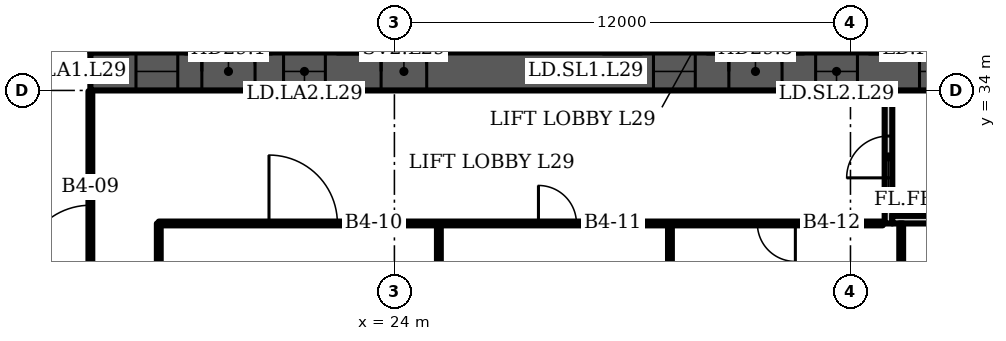
"""IFC4 building model, lengths in metres.
Left out: names, types, materials, properties, quantities, classifications, styles, units other than length and angle.
Written with IfcOpenShell. Run it as: python <this file> out.ifc"""

import sys

from ifc_helpers import new_model, si_unit, direction, frame, frame_2d, origin, place, context, subcontext, project, spatial, rectangle, extrude, element, fill, save


model = new_model("IFC4")
c1 = context("Model", 3, precision=1e-05, world=origin(), true_north=direction((0.0, 1.0)))
c2 = subcontext(c1, "Body", "Model", "MODEL_VIEW")
j1 = project(units=[si_unit("LENGTHUNIT", "METRE"), si_unit("PLANEANGLEUNIT", "RADIAN")], contexts=[c1])
p1 = place(None, origin())
s1 = spatial("IfcSite", under=j1, at=p1, CompositionType="ELEMENT")
p2 = place(p1, origin())
s2 = spatial("IfcBuilding", under=s1, at=p2, CompositionType="ELEMENT")
p3 = place(p2, frame((0.0, 0.0, 125.5)))
s3 = spatial("IfcBuildingStorey", under=s2, at=p3, CompositionType="ELEMENT", Elevation=125.5)
p4 = place(p3, frame((16.0, 34.5, 0.0), z_axis=(0.0, 0.0, 1.0), x_axis=(1.0, 0.0, 0.0)))
e1 = element("IfcWall", 1, at=p4, inside=s3, PredefinedType="SHEAR", context=c2, shape_type="SweptSolid", body=[
    extrude(rectangle(XDim=49.0, YDim=1.0, at=frame_2d((24.5, 0.0))), origin(), (0.0, 0.0, 1.0), 3.6),
])
p5 = place(p4, frame((1.2, 0.0, 0.0)))
e2 = element("IfcOpeningElement", 2, at=p5, cuts=e1, PredefinedType="OPENING", context=c2, shape_type="SweptSolid", body=[
    extrude(rectangle(XDim=1.1, YDim=2.1, at=frame_2d((0.55, 1.05))), frame((0.0, 0.51, 0.0), z_axis=(0.0, -1.0, 0.0), x_axis=(1.0, 0.0, 0.0)), (0.0, 0.0, 1.0), 1.02),
])
p6 = place(p4, frame((5.083, 0.0, 0.0)))
e3 = element("IfcOpeningElement", 3, at=p6, cuts=e1, PredefinedType="OPENING", context=c2, shape_type="SweptSolid", body=[
    extrude(rectangle(XDim=1.1, YDim=2.1, at=frame_2d((0.55, 1.05))), frame((0.0, 0.51, 0.0), z_axis=(0.0, -1.0, 0.0), x_axis=(1.0, 0.0, 0.0)), (0.0, 0.0, 1.0), 1.02),
])
p7 = place(p4, frame((2.933, 0.0, 0.0)))
e4 = element("IfcOpeningElement", 4, at=p7, cuts=e1, PredefinedType="OPENING", context=c2, shape_type="SweptSolid", body=[
    extrude(rectangle(XDim=1.4, YDim=2.1, at=frame_2d((0.7, 1.05))), frame((0.0, 0.51, 0.0), z_axis=(0.0, -1.0, 0.0), x_axis=(1.0, 0.0, 0.0)), (0.0, 0.0, 1.0), 1.02),
])
p8 = place(p4, frame((7.65, 0.0, 0.0)))
e5 = element("IfcOpeningElement", 5, at=p8, cuts=e1, PredefinedType="OPENING", context=c2, shape_type="SweptSolid", body=[
    extrude(rectangle(XDim=1.2, YDim=2.1, at=frame_2d((0.6, 1.05))), frame((0.0, 0.51, 0.0), z_axis=(0.0, -1.0, 0.0), x_axis=(1.0, 0.0, 0.0)), (0.0, 0.0, 1.0), 1.02),
])
p9 = place(p4, frame((14.817, 0.0, 0.0)))
e6 = element("IfcOpeningElement", 6, at=p9, cuts=e1, PredefinedType="OPENING", context=c2, shape_type="SweptSolid", body=[
    extrude(rectangle(XDim=1.1, YDim=2.1, at=frame_2d((0.55, 1.05))), frame((0.0, 0.51, 0.0), z_axis=(0.0, -1.0, 0.0), x_axis=(1.0, 0.0, 0.0)), (0.0, 0.0, 1.0), 1.02),
])
p10 = place(p4, frame((19.083, 0.0, 0.0)))
e7 = element("IfcOpeningElement", 7, at=p10, cuts=e1, PredefinedType="OPENING", context=c2, shape_type="SweptSolid", body=[
    extrude(rectangle(XDim=1.1, YDim=2.1, at=frame_2d((0.55, 1.05))), frame((0.0, 0.51, 0.0), z_axis=(0.0, -1.0, 0.0), x_axis=(1.0, 0.0, 0.0)), (0.0, 0.0, 1.0), 1.02),
])
p11 = place(p4, frame((16.8, 0.0, 0.0)))
e8 = element("IfcOpeningElement", 8, at=p11, cuts=e1, PredefinedType="OPENING", context=c2, shape_type="SweptSolid", body=[
    extrude(rectangle(XDim=1.4, YDim=2.1, at=frame_2d((0.7, 1.05))), frame((0.0, 0.51, 0.0), z_axis=(0.0, -1.0, 0.0), x_axis=(1.0, 0.0, 0.0)), (0.0, 0.0, 1.0), 1.02),
])
p12 = place(p4, frame((21.817, 0.0, 0.0)))
e9 = element("IfcOpeningElement", 9, at=p12, cuts=e1, PredefinedType="OPENING", context=c2, shape_type="SweptSolid", body=[
    extrude(rectangle(XDim=1.1, YDim=2.1, at=frame_2d((0.55, 1.05))), frame((0.0, 0.51, 0.0), z_axis=(0.0, -1.0, 0.0), x_axis=(1.0, 0.0, 0.0)), (0.0, 0.0, 1.0), 1.02),
])
p13 = place(p4, frame((26.083, 0.0, 0.0)))
e10 = element("IfcOpeningElement", 10, at=p13, cuts=e1, PredefinedType="OPENING", context=c2, shape_type="SweptSolid", body=[
    extrude(rectangle(XDim=1.1, YDim=2.1, at=frame_2d((0.55, 1.05))), frame((0.0, 0.51, 0.0), z_axis=(0.0, -1.0, 0.0), x_axis=(1.0, 0.0, 0.0)), (0.0, 0.0, 1.0), 1.02),
])
p14 = place(p4, frame((33.15, 0.0, 0.0)))
e11 = element("IfcOpeningElement", 11, at=p14, cuts=e1, PredefinedType="OPENING", context=c2, shape_type="SweptSolid", body=[
    extrude(rectangle(XDim=1.2, YDim=2.1, at=frame_2d((0.6, 1.05))), frame((0.0, 0.51, 0.0), z_axis=(0.0, -1.0, 0.0), x_axis=(1.0, 0.0, 0.0)), (0.0, 0.0, 1.0), 1.02),
])
p15 = place(p4, frame((37.8, 0.0, 0.0)))
e12 = element("IfcOpeningElement", 12, at=p15, cuts=e1, PredefinedType="OPENING", context=c2, shape_type="SweptSolid", body=[
    extrude(rectangle(XDim=1.4, YDim=2.1, at=frame_2d((0.7, 1.05))), frame((0.0, 0.51, 0.0), z_axis=(0.0, -1.0, 0.0), x_axis=(1.0, 0.0, 0.0)), (0.0, 0.0, 1.0), 1.02),
])
p16 = place(p4, frame((42.817, 0.0, 0.0)))
e13 = element("IfcOpeningElement", 13, at=p16, cuts=e1, PredefinedType="OPENING", context=c2, shape_type="SweptSolid", body=[
    extrude(rectangle(XDim=1.1, YDim=2.1, at=frame_2d((0.55, 1.05))), frame((0.0, 0.51, 0.0), z_axis=(0.0, -1.0, 0.0), x_axis=(1.0, 0.0, 0.0)), (0.0, 0.0, 1.0), 1.02),
])
p17 = place(p4, frame((46.7, 0.0, 0.0)))
e14 = element("IfcOpeningElement", 14, at=p17, cuts=e1, PredefinedType="OPENING", context=c2, shape_type="SweptSolid", body=[
    extrude(rectangle(XDim=1.1, YDim=2.1, at=frame_2d((0.55, 1.05))), frame((0.0, 0.51, 0.0), z_axis=(0.0, -1.0, 0.0), x_axis=(1.0, 0.0, 0.0)), (0.0, 0.0, 1.0), 1.02),
])
p18 = place(p4, frame((44.667, 0.0, 0.0)))
e15 = element("IfcOpeningElement", 15, at=p18, cuts=e1, PredefinedType="OPENING", context=c2, shape_type="SweptSolid", body=[
    extrude(rectangle(XDim=1.4, YDim=2.1, at=frame_2d((0.7, 1.05))), frame((0.0, 0.51, 0.0), z_axis=(0.0, -1.0, 0.0), x_axis=(1.0, 0.0, 0.0)), (0.0, 0.0, 1.0), 1.02),
])
p19 = place(p3, frame((37.0, 30.5, 0.0), z_axis=(0.0, 0.0, 1.0), x_axis=(0.0, 1.0, 0.0)))
e16 = element("IfcWall", 16, at=p19, inside=s3, PredefinedType="PARTITIONING", context=c2, shape_type="SweptSolid", body=[
    extrude(rectangle(XDim=3.5, YDim=0.2, at=frame_2d((1.75, 0.0))), origin(), (0.0, 0.0, 1.0), 3.2),
])
p20 = place(p19, frame((1.2, 0.0, 0.0)))
e17 = element("IfcOpeningElement", 17, at=p20, cuts=e16, PredefinedType="OPENING", context=c2, shape_type="SweptSolid", body=[
    extrude(rectangle(XDim=1.1, YDim=2.1, at=frame_2d((0.55, 1.05))), frame((0.0, 0.11, 0.0), z_axis=(0.0, -1.0, 0.0), x_axis=(1.0, 0.0, 0.0)), (0.0, 0.0, 1.0), 0.22),
])
p21 = place(p3, frame((37.1, 30.6, 0.0), z_axis=(0.0, 0.0, 1.0), x_axis=(1.0, 0.0, 0.0)))
e18 = element("IfcWall", 18, at=p21, inside=s3, PredefinedType="PARTITIONING", context=c2, shape_type="SweptSolid", body=[
    extrude(rectangle(XDim=2.8, YDim=0.2, at=frame_2d((1.4, 0.0))), origin(), (0.0, 0.0, 1.0), 3.2),
])
p22 = place(p3, frame((16.0, 26.22, 0.0), z_axis=(0.0, 0.0, 1.0), x_axis=(0.0, 1.0, 0.0)))
e19 = element("IfcWall", 19, at=p22, inside=s3, PredefinedType="PARTITIONING", context=c2, shape_type="SweptSolid", body=[
    extrude(rectangle(XDim=7.76, YDim=0.1, at=frame_2d((3.88, 0.0))), origin(), (0.0, 0.0, 1.0), 3.2),
])
p23 = place(p22, frame((2.96, 0.0, 0.0)))
e20 = element("IfcOpeningElement", 20, at=p23, cuts=e19, PredefinedType="OPENING", context=c2, shape_type="SweptSolid", body=[
    extrude(rectangle(XDim=1.8, YDim=2.1, at=frame_2d((0.9, 1.05))), frame((0.0, 0.06, 0.0), z_axis=(0.0, -1.0, 0.0), x_axis=(1.0, 0.0, 0.0)), (0.0, 0.0, 1.0), 0.12),
])
p24 = place(p3, frame((17.8, 21.8, 0.0), z_axis=(0.0, 0.0, 1.0), x_axis=(0.0, 1.0, 0.0)))
e21 = element("IfcWall", 21, at=p24, inside=s3, PredefinedType="PARTITIONING", context=c2, shape_type="SweptSolid", body=[
    extrude(rectangle(XDim=8.7, YDim=0.1, at=frame_2d((4.35, 0.0))), origin(), (0.0, 0.0, 1.0), 3.2),
])
p25 = place(p3, frame((17.8, 30.5, 0.0), z_axis=(0.0, 0.0, 1.0), x_axis=(1.0, 0.0, 0.0)))
e22 = element("IfcWall", 22, at=p25, inside=s3, PredefinedType="PARTITIONING", context=c2, shape_type="SweptSolid", body=[
    extrude(rectangle(XDim=19.05, YDim=0.1, at=frame_2d((9.525, 0.0))), origin(), (0.0, 0.0, 1.0), 3.2),
])
p26 = place(p25, frame((2.9, 0.0, 0.0)))
e23 = element("IfcOpeningElement", 23, at=p26, cuts=e22, PredefinedType="OPENING", context=c2, shape_type="SweptSolid", body=[
    extrude(rectangle(XDim=1.8, YDim=2.1, at=frame_2d((0.9, 1.05))), frame((0.0, 0.06, 0.0), z_axis=(0.0, -1.0, 0.0), x_axis=(1.0, 0.0, 0.0)), (0.0, 0.0, 1.0), 0.12),
])
p27 = place(p25, frame((9.99, 0.0, 0.0)))
e24 = element("IfcOpeningElement", 24, at=p27, cuts=e22, PredefinedType="OPENING", context=c2, shape_type="SweptSolid", body=[
    extrude(rectangle(XDim=1.0, YDim=2.1, at=frame_2d((0.5, 1.05))), frame((0.0, 0.06, 0.0), z_axis=(0.0, -1.0, 0.0), x_axis=(1.0, 0.0, 0.0)), (0.0, 0.0, 1.0), 0.12),
])
p28 = place(p25, frame((15.75, 0.0, 0.0)))
e25 = element("IfcOpeningElement", 25, at=p28, cuts=e22, PredefinedType="OPENING", context=c2, shape_type="SweptSolid", body=[
    extrude(rectangle(XDim=1.0, YDim=2.1, at=frame_2d((0.5, 1.05))), frame((0.0, 0.06, 0.0), z_axis=(0.0, -1.0, 0.0), x_axis=(1.0, 0.0, 0.0)), (0.0, 0.0, 1.0), 0.12),
])
p29 = place(p3, frame((25.17, 1.12, 0.0), z_axis=(0.0, 0.0, 1.0), x_axis=(0.0, 1.0, 0.0)))
e26 = element("IfcWall", 26, at=p29, inside=s3, PredefinedType="PARTITIONING", context=c2, shape_type="SweptSolid", body=[
    extrude(rectangle(XDim=29.38, YDim=0.1, at=frame_2d((14.69, 0.0))), origin(), (0.0, 0.0, 1.0), 3.2),
])
p30 = place(p3, frame((31.25, 0.59, 0.0), z_axis=(0.0, 0.0, 1.0), x_axis=(0.0, 1.0, 0.0)))
e27 = element("IfcWall", 27, at=p30, inside=s3, PredefinedType="PARTITIONING", context=c2, shape_type="SweptSolid", body=[
    extrude(rectangle(XDim=29.91, YDim=0.1, at=frame_2d((14.955, 0.0))), origin(), (0.0, 0.0, 1.0), 3.2),
])
p31 = place(p3, frame((37.335, 0.055, 0.0), z_axis=(0.0, 0.0, 1.0), x_axis=(0.0, 1.0, 0.0)))
e28 = element("IfcWall", 28, at=p31, inside=s3, PredefinedType="PARTITIONING", context=c2, shape_type="SweptSolid", body=[
    extrude(rectangle(XDim=30.445, YDim=0.1, at=frame_2d((15.223, 0.0))), origin(), (0.0, 0.0, 1.0), 3.2),
])
p32 = place(p5, origin())
e29 = element("IfcDoor", 29, at=p32, inside=s3, OperationType="DOUBLE_DOOR_SLIDING", PredefinedType="DOOR", context=c2, shape_type="SweptSolid", body=[
    extrude(rectangle(XDim=1.1, YDim=2.1, at=frame_2d((0.55, 1.05))), frame((0.0, 0.025, 0.0), z_axis=(0.0, -1.0, 0.0), x_axis=(1.0, 0.0, 0.0)), (0.0, 0.0, 1.0), 0.05),
])
fill(e2, e29)
p33 = place(p6, origin())
e30 = element("IfcDoor", 30, at=p33, inside=s3, OperationType="DOUBLE_DOOR_SLIDING", PredefinedType="DOOR", context=c2, shape_type="SweptSolid", body=[
    extrude(rectangle(XDim=1.1, YDim=2.1, at=frame_2d((0.55, 1.05))), frame((0.0, 0.025, 0.0), z_axis=(0.0, -1.0, 0.0), x_axis=(1.0, 0.0, 0.0)), (0.0, 0.0, 1.0), 0.05),
])
fill(e3, e30)
p34 = place(p7, origin())
e31 = element("IfcDoor", 31, at=p34, inside=s3, OperationType="DOUBLE_DOOR_SINGLE_SWING", PredefinedType="DOOR", context=c2, shape_type="SweptSolid", body=[
    extrude(rectangle(XDim=1.4, YDim=2.1, at=frame_2d((0.7, 1.05))), frame((0.0, 0.025, 0.0), z_axis=(0.0, -1.0, 0.0), x_axis=(1.0, 0.0, 0.0)), (0.0, 0.0, 1.0), 0.05),
])
fill(e4, e31)
p35 = place(p8, origin())
e32 = element("IfcDoor", 32, at=p35, inside=s3, OperationType="SINGLE_SWING_LEFT", PredefinedType="DOOR", context=c2, shape_type="SweptSolid", body=[
    extrude(rectangle(XDim=1.2, YDim=2.1, at=frame_2d((0.6, 1.05))), frame((0.0, 0.025, 0.0), z_axis=(0.0, -1.0, 0.0), x_axis=(1.0, 0.0, 0.0)), (0.0, 0.0, 1.0), 0.05),
])
fill(e5, e32)
p36 = place(p9, origin())
e33 = element("IfcDoor", 33, at=p36, inside=s3, OperationType="DOUBLE_DOOR_SLIDING", PredefinedType="DOOR", context=c2, shape_type="SweptSolid", body=[
    extrude(rectangle(XDim=1.1, YDim=2.1, at=frame_2d((0.55, 1.05))), frame((0.0, 0.025, 0.0), z_axis=(0.0, -1.0, 0.0), x_axis=(1.0, 0.0, 0.0)), (0.0, 0.0, 1.0), 0.05),
])
fill(e6, e33)
p37 = place(p10, origin())
e34 = element("IfcDoor", 34, at=p37, inside=s3, OperationType="DOUBLE_DOOR_SLIDING", PredefinedType="DOOR", context=c2, shape_type="SweptSolid", body=[
    extrude(rectangle(XDim=1.1, YDim=2.1, at=frame_2d((0.55, 1.05))), frame((0.0, 0.025, 0.0), z_axis=(0.0, -1.0, 0.0), x_axis=(1.0, 0.0, 0.0)), (0.0, 0.0, 1.0), 0.05),
])
fill(e7, e34)
p38 = place(p11, origin())
e35 = element("IfcDoor", 35, at=p38, inside=s3, OperationType="DOUBLE_DOOR_SINGLE_SWING", PredefinedType="DOOR", context=c2, shape_type="SweptSolid", body=[
    extrude(rectangle(XDim=1.4, YDim=2.1, at=frame_2d((0.7, 1.05))), frame((0.0, 0.025, 0.0), z_axis=(0.0, -1.0, 0.0), x_axis=(1.0, 0.0, 0.0)), (0.0, 0.0, 1.0), 0.05),
])
fill(e8, e35)
p39 = place(p12, origin())
e36 = element("IfcDoor", 36, at=p39, inside=s3, OperationType="DOUBLE_DOOR_SLIDING", PredefinedType="DOOR", context=c2, shape_type="SweptSolid", body=[
    extrude(rectangle(XDim=1.1, YDim=2.1, at=frame_2d((0.55, 1.05))), frame((0.0, 0.025, 0.0), z_axis=(0.0, -1.0, 0.0), x_axis=(1.0, 0.0, 0.0)), (0.0, 0.0, 1.0), 0.05),
])
fill(e9, e36)
p40 = place(p20, origin())
e37 = element("IfcDoor", 37, at=p40, inside=s3, OperationType="SINGLE_SWING_LEFT", PredefinedType="DOOR", context=c2, shape_type="SweptSolid", body=[
    extrude(rectangle(XDim=1.1, YDim=2.1, at=frame_2d((0.55, 1.05))), frame((0.0, 0.025, 0.0), z_axis=(0.0, -1.0, 0.0), x_axis=(1.0, 0.0, 0.0)), (0.0, 0.0, 1.0), 0.05),
])
fill(e17, e37)
p41 = place(p23, origin())
e38 = element("IfcDoor", 38, at=p41, inside=s3, OperationType="DOUBLE_DOOR_SINGLE_SWING", PredefinedType="DOOR", context=c2, shape_type="SweptSolid", body=[
    extrude(rectangle(XDim=1.8, YDim=2.1, at=frame_2d((0.9, 1.05))), frame((0.0, 0.025, 0.0), z_axis=(0.0, -1.0, 0.0), x_axis=(1.0, 0.0, 0.0)), (0.0, 0.0, 1.0), 0.05),
])
fill(e20, e38)
p42 = place(p26, origin())
e39 = element("IfcDoor", 39, at=p42, inside=s3, OperationType="DOUBLE_DOOR_SINGLE_SWING", PredefinedType="DOOR", context=c2, shape_type="SweptSolid", body=[
    extrude(rectangle(XDim=1.8, YDim=2.1, at=frame_2d((0.9, 1.05))), frame((0.0, 0.025, 0.0), z_axis=(0.0, -1.0, 0.0), x_axis=(1.0, 0.0, 0.0)), (0.0, 0.0, 1.0), 0.05),
])
fill(e23, e39)
p43 = place(p27, origin())
e40 = element("IfcDoor", 40, at=p43, inside=s3, OperationType="SINGLE_SWING_LEFT", PredefinedType="DOOR", context=c2, shape_type="SweptSolid", body=[
    extrude(rectangle(XDim=1.0, YDim=2.1, at=frame_2d((0.5, 1.05))), frame((0.0, 0.025, 0.0), z_axis=(0.0, -1.0, 0.0), x_axis=(1.0, 0.0, 0.0)), (0.0, 0.0, 1.0), 0.05),
])
fill(e24, e40)
p44 = place(p28, origin())
e41 = element("IfcDoor", 41, at=p44, inside=s3, OperationType="SINGLE_SWING_RIGHT", PredefinedType="DOOR", context=c2, shape_type="SweptSolid", body=[
    extrude(rectangle(XDim=1.0, YDim=2.1, at=frame_2d((0.5, 1.05))), frame((0.0, 0.025, 0.0), z_axis=(0.0, -1.0, 0.0), x_axis=(1.0, 0.0, 0.0)), (0.0, 0.0, 1.0), 0.05),
])
fill(e25, e41)
save(model, sys.argv[1])
